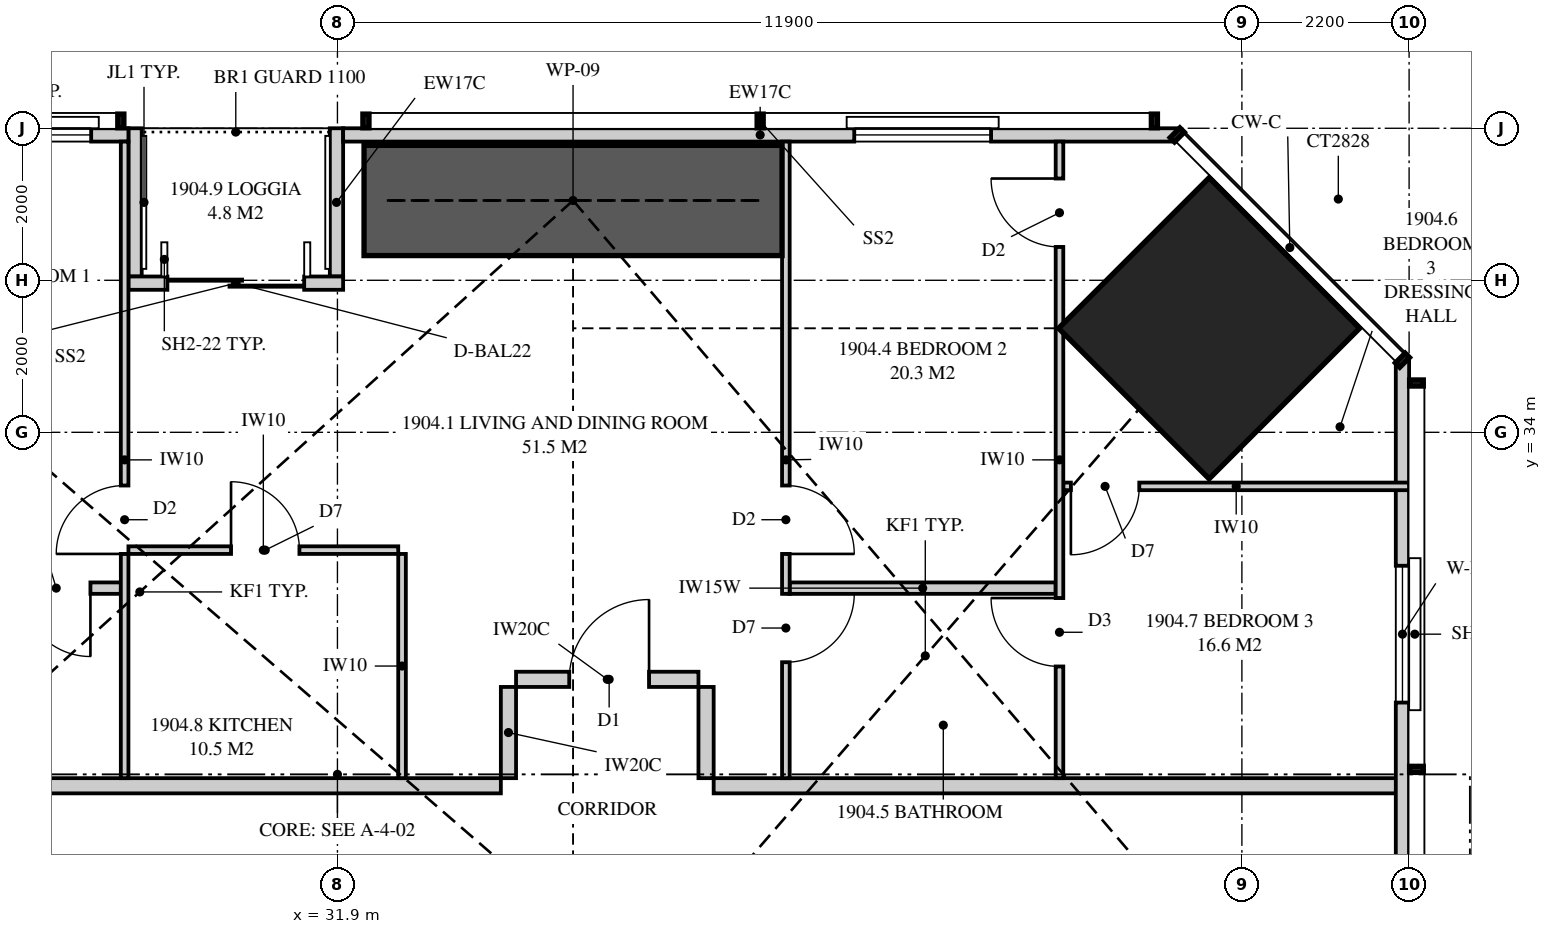
"""IFC4 building model, lengths in metres.
Left out: names, types, materials, properties, quantities, classifications, styles, units other than length and angle.
Written with IfcOpenShell. Run it as: python <this file> out.ifc"""

import sys

from ifc_helpers import new_model, si_unit, direction, frame, frame_2d, origin, origin_2d, place, context, subcontext, project, spatial, polyline, rectangle, hollow_rectangle, outline, extrude, element, fill, save


model = new_model("IFC4")
c1 = context("Model", 3, precision=1e-05, world=origin(), true_north=direction((0.0, 1.0)))
c2 = subcontext(c1, "Body", "Model", "MODEL_VIEW")
j1 = project(units=[si_unit("LENGTHUNIT", "METRE"), si_unit("PLANEANGLEUNIT", "RADIAN")], contexts=[c1])
p1 = place(None, origin())
s1 = spatial("IfcSite", under=j1, at=p1, CompositionType="ELEMENT")
p2 = place(p1, origin())
s2 = spatial("IfcBuilding", under=s1, at=p2, CompositionType="ELEMENT")
p3 = place(p2, frame((0.0, 0.0, 71.25)))
s3 = spatial("IfcBuildingStorey", under=s2, at=p3, CompositionType="ELEMENT", Elevation=71.25)
p4 = place(p3, frame((43.369, 35.369, 0.0), z_axis=(0.0, 0.0, 1.0), x_axis=(-0.707106781187, -0.707106781187, 0.0)))
e1 = element("IfcColumn", 1, at=p4, inside=s3, PredefinedType="COLUMN", context=c2, shape_type="SweptSolid", body=[
    extrude(hollow_rectangle(XDim=2.8, YDim=2.8, WallThickness=0.25, at=origin_2d()), origin(), (0.0, 0.0, 1.0), 3.5),
])
p5 = place(p3, frame((45.913, 3.051, 0.0), z_axis=(0.0, 0.0, 1.0), x_axis=(0.0, 1.0, 0.0)))
e2 = element("IfcWall", 2, at=p5, inside=s3, PredefinedType="SOLIDWALL", context=c2, shape_type="SweptSolid", body=[
    extrude(outline(polyline([(0.0, 0.0), (31.897, 0.0), (31.897, 3.22), (21.495, 3.22), (21.495, 2.256), (18.993, 3.22), (0.0, 3.22), (0.0, 0.0)])), frame((0.0, 0.087, 0.0), z_axis=(0.0, -1.0, 0.0), x_axis=(1.0, 0.0, 0.0)), (0.0, 0.0, 1.0), 0.175),
])
p6 = place(p5, frame((2.204, 0.0, 0.4)))
e3 = element("IfcOpeningElement", 3, at=p6, cuts=e2, PredefinedType="OPENING", context=c2, shape_type="SweptSolid", body=[
    extrude(rectangle(XDim=1.8, YDim=1.85, at=frame_2d((0.9, 0.925))), frame((0.0, 0.097, 0.0), z_axis=(0.0, -1.0, 0.0), x_axis=(1.0, 0.0, 0.0)), (0.0, 0.0, 1.0), 0.195),
])
p7 = place(p5, frame((14.849, 0.0, 0.4)))
e4 = element("IfcOpeningElement", 4, at=p7, cuts=e2, PredefinedType="OPENING", context=c2, shape_type="SweptSolid", body=[
    extrude(rectangle(XDim=1.2, YDim=1.85, at=frame_2d((0.6, 0.925))), frame((0.0, 0.097, 0.0), z_axis=(0.0, -1.0, 0.0), x_axis=(1.0, 0.0, 0.0)), (0.0, 0.0, 1.0), 0.195),
])
p8 = place(p5, frame((27.393, 0.0, 0.4)))
e5 = element("IfcOpeningElement", 5, at=p8, cuts=e2, PredefinedType="OPENING", context=c2, shape_type="SweptSolid", body=[
    extrude(rectangle(XDim=1.8, YDim=1.85, at=frame_2d((0.9, 0.925))), frame((0.0, 0.097, 0.0), z_axis=(0.0, -1.0, 0.0), x_axis=(1.0, 0.0, 0.0)), (0.0, 0.0, 1.0), 0.195),
])
p9 = place(p3, frame((42.949, 37.913, 0.0), z_axis=(0.0, 0.0, 1.0), x_axis=(-1.0, 0.0, 0.0)))
e6 = element("IfcWall", 6, at=p9, inside=s3, PredefinedType="SOLIDWALL", context=c2, shape_type="SweptSolid", body=[
    extrude(rectangle(XDim=10.974, YDim=0.175, at=frame_2d((5.487, 0.0))), origin(), (0.0, 0.0, 1.0), 3.22),
])
p10 = place(p9, frame((2.449, 0.0, 0.4)))
e7 = element("IfcOpeningElement", 7, at=p10, cuts=e6, PredefinedType="OPENING", context=c2, shape_type="SweptSolid", body=[
    extrude(rectangle(XDim=1.8, YDim=1.85, at=frame_2d((0.9, 0.925))), frame((0.0, 0.097, 0.0), z_axis=(0.0, -1.0, 0.0), x_axis=(1.0, 0.0, 0.0)), (0.0, 0.0, 1.0), 0.195),
])
p11 = place(p3, frame((29.15, 37.913, 0.0), z_axis=(0.0, 0.0, 1.0), x_axis=(-1.0, 0.0, 0.0)))
e8 = element("IfcWall", 8, at=p11, inside=s3, PredefinedType="SOLIDWALL", context=c2, shape_type="SweptSolid", body=[
    extrude(rectangle(XDim=7.95, YDim=0.175, at=frame_2d((3.975, 0.0))), origin(), (0.0, 0.0, 1.0), 3.22),
])
p12 = place(p11, frame((0.49, 0.0, 0.4)))
e9 = element("IfcOpeningElement", 9, at=p12, cuts=e8, PredefinedType="OPENING", context=c2, shape_type="SweptSolid", body=[
    extrude(rectangle(XDim=1.8, YDim=1.85, at=frame_2d((0.9, 0.925))), frame((0.0, 0.097, 0.0), z_axis=(0.0, -1.0, 0.0), x_axis=(1.0, 0.0, 0.0)), (0.0, 0.0, 1.0), 0.195),
])
p13 = place(p3, frame((31.975, 35.962, 0.0), z_axis=(0.0, 0.0, 1.0), x_axis=(-1.0, 0.0, 0.0)))
e10 = element("IfcWall", 10, at=p13, inside=s3, PredefinedType="SOLIDWALL", context=c2, shape_type="SweptSolid", body=[
    extrude(rectangle(XDim=2.825, YDim=0.175, at=frame_2d((1.413, 0.0))), origin(), (0.0, 0.0, 1.0), 3.22),
])
p14 = place(p13, frame((0.512, 0.0, 0.0)))
e11 = element("IfcOpeningElement", 11, at=p14, cuts=e10, PredefinedType="OPENING", context=c2, shape_type="SweptSolid", body=[
    extrude(rectangle(XDim=1.8, YDim=2.25, at=frame_2d((0.9, 1.125))), frame((0.0, 0.097, 0.0), z_axis=(0.0, -1.0, 0.0), x_axis=(1.0, 0.0, 0.0)), (0.0, 0.0, 1.0), 0.195),
])
for number, where, z_axis, x_axis in (
    (12, (31.887, 38.0, 0.0), (0.0, 0.0, 1.0), (0.0, -1.0, 0.0)),
    (13, (29.238, 38.0, 0.0), (0.0, 0.0, 1.0), (0.0, -1.0, 0.0)),
):
    element("IfcWall", number, at=place(p3, frame(where, z_axis=z_axis, x_axis=x_axis)), inside=s3, PredefinedType="SOLIDWALL", context=c2, shape_type="SweptSolid", body=[
        extrude(outline(polyline([(0.0, 0.0), (1.95, 0.0), (1.95, 3.22), (1.65, 3.22), (1.65, 2.1), (0.25, 2.1), (0.25, 3.22), (0.0, 3.22), (0.0, 0.0)])), frame((0.0, 0.087, 0.0), z_axis=(0.0, -1.0, 0.0), x_axis=(1.0, 0.0, 0.0)), (0.0, 0.0, 1.0), 0.175),
    ])
p15 = place(p3, frame((25.0, 29.35, 0.0), z_axis=(0.0, 0.0, 1.0), x_axis=(1.0, 0.0, 0.0)))
e14 = element("IfcWall", 14, at=p15, inside=s3, PredefinedType="PARTITIONING", context=c2, shape_type="SweptSolid", body=[
    extrude(outline(polyline([(0.0, 0.0), (9.05, 0.0), (9.05, 3.22), (8.373, 3.22), (8.373, 2.641), (7.42, 2.641), (7.42, 3.22), (1.941, 3.22), (1.941, 2.641), (1.015, 2.641), (1.015, 3.22), (0.0, 3.22), (0.0, 0.0)])), frame((0.0, 0.1, 0.0), z_axis=(0.0, -1.0, 0.0), x_axis=(1.0, 0.0, 0.0)), (0.0, 0.0, 1.0), 0.2),
])
p16 = place(p3, frame((29.1, 37.825, 0.0), z_axis=(0.0, 0.0, 1.0), x_axis=(0.0, -1.0, 0.0)))
e15 = element("IfcWall", 15, at=p16, inside=s3, PredefinedType="PARTITIONING", context=c2, shape_type="SweptSolid", body=[
    extrude(outline(polyline([(0.0, 0.0), (8.375, 0.0), (8.375, 3.22), (6.469, 3.22), (6.469, 2.641), (5.742, 2.641), (5.742, 3.22), (5.545, 3.22), (5.545, 2.641), (4.833, 2.641), (4.833, 3.22), (1.475, 3.22), (1.475, 2.1), (0.075, 2.1), (0.075, 3.22), (0.0, 3.22), (0.0, 0.0)])), frame((0.0, 0.05, 0.0), z_axis=(0.0, -1.0, 0.0), x_axis=(1.0, 0.0, 0.0)), (0.0, 0.0, 1.0), 0.1),
])
p17 = place(p16, frame((4.525, 0.0, 0.0)))
e16 = element("IfcOpeningElement", 16, at=p17, cuts=e15, PredefinedType="OPENING", context=c2, shape_type="SweptSolid", body=[
    extrude(rectangle(XDim=0.9, YDim=2.1, at=frame_2d((0.45, 1.05))), frame((0.0, 0.06, 0.0), z_axis=(0.0, -1.0, 0.0), x_axis=(1.0, 0.0, 0.0)), (0.0, 0.0, 1.0), 0.12),
])
p18 = place(p3, frame((37.8, 37.825, 0.0), z_axis=(0.0, 0.0, 1.0), x_axis=(0.0, -1.0, 0.0)))
e17 = element("IfcWall", 17, at=p18, inside=s3, PredefinedType="PARTITIONING", context=c2, shape_type="SweptSolid", body=[
    extrude(outline(polyline([(0.0, 0.0), (8.375, 0.0), (8.375, 3.22), (4.474, 3.22), (4.474, 2.641), (3.716, 2.641), (3.716, 2.62), (2.062, 2.62), (2.062, 2.1), (0.614, 2.1), (0.614, 3.22), (0.0, 3.22), (0.0, 0.0)])), frame((0.0, 0.05, 0.0), z_axis=(0.0, -1.0, 0.0), x_axis=(1.0, 0.0, 0.0)), (0.0, 0.0, 1.0), 0.1),
])
p19 = place(p18, frame((4.525, 0.0, 0.0)))
e18 = element("IfcOpeningElement", 18, at=p19, cuts=e17, PredefinedType="OPENING", context=c2, shape_type="SweptSolid", body=[
    extrude(rectangle(XDim=0.9, YDim=2.1, at=frame_2d((0.45, 1.05))), frame((0.0, 0.06, 0.0), z_axis=(0.0, -1.0, 0.0), x_axis=(1.0, 0.0, 0.0)), (0.0, 0.0, 1.0), 0.12),
])
p20 = place(p18, frame((5.95, 0.0, 0.0)))
e19 = element("IfcOpeningElement", 19, at=p20, cuts=e17, PredefinedType="OPENING", context=c2, shape_type="SweptSolid", body=[
    extrude(rectangle(XDim=0.9, YDim=2.1, at=frame_2d((0.45, 1.05))), frame((0.0, 0.06, 0.0), z_axis=(0.0, -1.0, 0.0), x_axis=(1.0, 0.0, 0.0)), (0.0, 0.0, 1.0), 0.12),
])
p21 = place(p3, frame((41.4, 37.825, 0.0), z_axis=(0.0, 0.0, 1.0), x_axis=(0.0, -1.0, 0.0)))
e20 = element("IfcWall", 20, at=p21, inside=s3, PredefinedType="PARTITIONING", context=c2, shape_type="SweptSolid", body=[
    extrude(outline(polyline([(0.0, 0.0), (8.375, 0.0), (8.375, 2.641), (7.844, 2.641), (7.844, 3.22), (5.146, 3.22), (5.146, 2.641), (4.31, 2.641), (4.31, 3.22), (3.716, 3.22), (3.716, 2.62), (2.785, 2.62), (2.785, 2.1), (1.337, 2.1), (1.337, 2.62), (1.196, 2.62), (1.196, 3.22), (0.0, 3.22), (0.0, 0.0)])), frame((0.0, 0.05, 0.0), z_axis=(0.0, -1.0, 0.0), x_axis=(1.0, 0.0, 0.0)), (0.0, 0.0, 1.0), 0.1),
])
p22 = place(p21, frame((0.486, 0.0, 0.0)))
e21 = element("IfcOpeningElement", 21, at=p22, cuts=e20, PredefinedType="OPENING", context=c2, shape_type="SweptSolid", body=[
    extrude(rectangle(XDim=0.9, YDim=2.1, at=frame_2d((0.45, 1.05))), frame((0.0, 0.06, 0.0), z_axis=(0.0, -1.0, 0.0), x_axis=(1.0, 0.0, 0.0)), (0.0, 0.0, 1.0), 0.12),
])
p23 = place(p21, frame((6.006, 0.0, 0.0)))
e22 = element("IfcOpeningElement", 22, at=p23, cuts=e20, PredefinedType="OPENING", context=c2, shape_type="SweptSolid", body=[
    extrude(rectangle(XDim=0.9, YDim=2.1, at=frame_2d((0.45, 1.05))), frame((0.0, 0.06, 0.0), z_axis=(0.0, -1.0, 0.0), x_axis=(1.0, 0.0, 0.0)), (0.0, 0.0, 1.0), 0.12),
])
p24 = place(p3, frame((25.0, 31.95, 0.0), z_axis=(0.0, 0.0, 1.0), x_axis=(1.0, 0.0, 0.0)))
e23 = element("IfcWall", 23, at=p24, inside=s3, PredefinedType="PLUMBINGWALL", context=c2, shape_type="SweptSolid", body=[
    extrude(outline(polyline([(0.0, 0.0), (4.05, 0.0), (4.05, 2.641), (3.92, 2.641), (3.92, 3.22), (0.0, 3.22), (0.0, 0.0)])), frame((0.0, 0.075, 0.0), z_axis=(0.0, -1.0, 0.0), x_axis=(1.0, 0.0, 0.0)), (0.0, 0.0, 1.0), 0.15),
])
p25 = place(p24, frame((2.75, 0.0, 0.0)))
e24 = element("IfcOpeningElement", 24, at=p25, cuts=e23, PredefinedType="OPENING", context=c2, shape_type="SweptSolid", body=[
    extrude(rectangle(XDim=0.9, YDim=2.1, at=frame_2d((0.45, 1.05))), frame((0.0, 0.085, 0.0), z_axis=(0.0, -1.0, 0.0), x_axis=(1.0, 0.0, 0.0)), (0.0, 0.0, 1.0), 0.17),
])
p26 = place(p3, frame((37.85, 31.95, 0.0), z_axis=(0.0, 0.0, 1.0), x_axis=(1.0, 0.0, 0.0)))
e25 = element("IfcWall", 25, at=p26, inside=s3, PredefinedType="PLUMBINGWALL", context=c2, shape_type="SweptSolid", body=[
    extrude(outline(polyline([(0.0, 0.0), (3.5, 0.0), (3.5, 3.22), (2.934, 3.22), (2.934, 2.641), (2.179, 2.641), (2.179, 3.22), (1.882, 3.22), (1.882, 2.641), (1.133, 2.641), (1.133, 3.22), (0.0, 3.22), (0.0, 0.0)])), frame((0.0, 0.075, 0.0), z_axis=(0.0, -1.0, 0.0), x_axis=(1.0, 0.0, 0.0)), (0.0, 0.0, 1.0), 0.15),
])
p27 = place(p3, frame((41.45, 33.289, 0.0), z_axis=(0.0, 0.0, 1.0), x_axis=(1.0, 0.0, 0.0)))
e26 = element("IfcWall", 26, at=p27, inside=s3, PredefinedType="PARTITIONING", context=c2, shape_type="SweptSolid", body=[
    extrude(outline(polyline([(0.0, 0.0), (4.55, 0.0), (4.55, 3.22), (2.973, 3.22), (2.973, 2.1), (1.539, 2.1), (1.539, 3.22), (0.472, 3.22), (0.472, 2.641), (0.0, 2.641), (0.0, 0.0)])), frame((0.0, 0.05, 0.0), z_axis=(0.0, -1.0, 0.0), x_axis=(1.0, 0.0, 0.0)), (0.0, 0.0, 1.0), 0.1),
])
p28 = place(p27, frame((0.1, 0.0, 0.0)))
e27 = element("IfcOpeningElement", 27, at=p28, cuts=e26, PredefinedType="OPENING", context=c2, shape_type="SweptSolid", body=[
    extrude(rectangle(XDim=0.9, YDim=2.1, at=frame_2d((0.45, 1.05))), frame((0.0, 0.06, 0.0), z_axis=(0.0, -1.0, 0.0), x_axis=(1.0, 0.0, 0.0)), (0.0, 0.0, 1.0), 0.12),
])
p29 = place(p3, frame((29.15, 32.45, 0.0), z_axis=(0.0, 0.0, 1.0), x_axis=(1.0, 0.0, 0.0)))
e28 = element("IfcWall", 28, at=p29, inside=s3, PredefinedType="PARTITIONING", context=c2, shape_type="SweptSolid", body=[
    extrude(outline(polyline([(0.0, 0.0), (3.55, 0.0), (3.55, 3.22), (1.167, 3.22), (1.167, 2.641), (0.0, 2.641), (0.0, 0.0)])), frame((0.0, 0.05, 0.0), z_axis=(0.0, -1.0, 0.0), x_axis=(1.0, 0.0, 0.0)), (0.0, 0.0, 1.0), 0.1),
])
p30 = place(p29, frame((1.35, 0.0, 0.0)))
e29 = element("IfcOpeningElement", 29, at=p30, cuts=e28, PredefinedType="OPENING", context=c2, shape_type="SweptSolid", body=[
    extrude(rectangle(XDim=0.9, YDim=2.1, at=frame_2d((0.45, 1.05))), frame((0.0, 0.06, 0.0), z_axis=(0.0, -1.0, 0.0), x_axis=(1.0, 0.0, 0.0)), (0.0, 0.0, 1.0), 0.12),
])
p31 = place(p3, frame((32.75, 32.4, 0.0), z_axis=(0.0, 0.0, 1.0), x_axis=(0.0, -1.0, 0.0)))
e30 = element("IfcWall", 30, at=p31, inside=s3, PredefinedType="PARTITIONING", context=c2, shape_type="SweptSolid", body=[
    extrude(outline(polyline([(0.0, 0.0), (2.95, 0.0), (2.95, 2.641), (2.568, 2.641), (2.568, 3.22), (0.0, 3.22), (0.0, 0.0)])), frame((0.0, 0.05, 0.0), z_axis=(0.0, -1.0, 0.0), x_axis=(1.0, 0.0, 0.0)), (0.0, 0.0, 1.0), 0.1),
])
p32 = place(p3, frame((36.85, 29.35, 0.0), z_axis=(0.0, 0.0, 1.0), x_axis=(1.0, 0.0, 0.0)))
e31 = element("IfcWall", 31, at=p32, inside=s3, PredefinedType="PARTITIONING", context=c2, shape_type="SweptSolid", body=[
    extrude(outline(polyline([(0.0, 0.0), (9.15, 0.0), (9.15, 3.22), (8.22, 3.22), (8.22, 2.1), (6.769, 2.1), (6.769, 3.22), (5.125, 3.22), (5.125, 2.641), (4.333, 2.641), (4.333, 3.22), (1.702, 3.22), (1.702, 2.641), (0.904, 2.641), (0.904, 3.22), (0.0, 3.22), (0.0, 0.0)])), frame((0.0, 0.1, 0.0), z_axis=(0.0, -1.0, 0.0), x_axis=(1.0, 0.0, 0.0)), (0.0, 0.0, 1.0), 0.2),
])
p33 = place(p3, frame((34.25, 30.75, 0.0), z_axis=(0.0, 0.0, 1.0), x_axis=(1.0, 0.0, 0.0)))
e32 = element("IfcWall", 32, at=p33, inside=s3, PredefinedType="PARTITIONING", context=c2, shape_type="SweptSolid", body=[
    extrude(outline(polyline([(0.0, 0.0), (2.4, 0.0), (2.4, 3.22), (1.099, 3.22), (1.099, 2.621), (0.401, 2.621), (0.401, 3.22), (0.0, 3.22), (0.0, 0.0)])), frame((0.0, 0.1, 0.0), z_axis=(0.0, -1.0, 0.0), x_axis=(1.0, 0.0, 0.0)), (0.0, 0.0, 1.0), 0.2),
])
p34 = place(p33, frame((0.7, 0.0, 0.0)))
e33 = element("IfcOpeningElement", 33, at=p34, cuts=e32, PredefinedType="OPENING", context=c2, shape_type="SweptSolid", body=[
    extrude(rectangle(XDim=1.05, YDim=2.2, at=frame_2d((0.525, 1.1))), frame((0.0, 0.11, 0.0), z_axis=(0.0, -1.0, 0.0), x_axis=(1.0, 0.0, 0.0)), (0.0, 0.0, 1.0), 0.22),
])
for number, where, z_axis, x_axis in (
    (34, (34.15, 29.45, 0.0), (0.0, 0.0, 1.0), (0.0, 1.0, 0.0)),
    (35, (36.75, 29.45, 0.0), (0.0, 0.0, 1.0), (0.0, 1.0, 0.0)),
):
    element("IfcWall", number, at=place(p3, frame(where, z_axis=z_axis, x_axis=x_axis)), inside=s3, PredefinedType="PARTITIONING", context=c2, shape_type="SweptSolid", body=[
        extrude(rectangle(XDim=1.2, YDim=0.2, at=frame_2d((0.6, 0.0))), origin(), (0.0, 0.0, 1.0), 3.22),
    ])
p35 = place(p3, frame((32.25, 37.05, 0.0), z_axis=(0.0, 0.0, 1.0), x_axis=(1.0, 0.0, 0.0)))
e36 = element("IfcWall", 36, at=p35, inside=s3, PredefinedType="SHEAR", context=c2, shape_type="SweptSolid", body=[
    extrude(rectangle(XDim=5.5, YDim=1.45, at=frame_2d((2.75, 0.0))), origin(), (0.0, 0.0, 1.0), 3.5),
])
p36 = place(p8, origin())
e37 = element("IfcWindow", 37, at=p36, inside=s3, PartitioningType="SINGLE_PANEL", PredefinedType="WINDOW", context=c2, shape_type="SweptSolid", body=[
    extrude(rectangle(XDim=1.8, YDim=1.85, at=frame_2d((0.9, 0.925))), frame((0.0, 0.03, 0.0), z_axis=(0.0, -1.0, 0.0), x_axis=(1.0, 0.0, 0.0)), (0.0, 0.0, 1.0), 0.06),
])
fill(e5, e37)
p37 = place(p10, origin())
e38 = element("IfcWindow", 38, at=p37, inside=s3, PartitioningType="SINGLE_PANEL", PredefinedType="WINDOW", context=c2, shape_type="SweptSolid", body=[
    extrude(rectangle(XDim=1.8, YDim=1.85, at=frame_2d((0.9, 0.925))), frame((0.0, 0.03, 0.0), z_axis=(0.0, -1.0, 0.0), x_axis=(1.0, 0.0, 0.0)), (0.0, 0.0, 1.0), 0.06),
])
fill(e7, e38)
p38 = place(p14, origin())
e39 = element("IfcDoor", 39, at=p38, inside=s3, OperationType="SLIDING_TO_LEFT", PredefinedType="DOOR", context=c2, shape_type="SweptSolid", body=[
    extrude(rectangle(XDim=1.8, YDim=2.25, at=frame_2d((0.9, 1.125))), frame((0.0, 0.025, 0.0), z_axis=(0.0, -1.0, 0.0), x_axis=(1.0, 0.0, 0.0)), (0.0, 0.0, 1.0), 0.05),
])
fill(e11, e39)
p39 = place(p12, origin())
e40 = element("IfcWindow", 40, at=p39, inside=s3, PartitioningType="SINGLE_PANEL", PredefinedType="WINDOW", context=c2, shape_type="SweptSolid", body=[
    extrude(rectangle(XDim=1.8, YDim=1.85, at=frame_2d((0.9, 0.925))), frame((0.0, 0.03, 0.0), z_axis=(0.0, -1.0, 0.0), x_axis=(1.0, 0.0, 0.0)), (0.0, 0.0, 1.0), 0.06),
])
fill(e9, e40)
p40 = place(p34, origin())
e41 = element("IfcDoor", 41, at=p40, inside=s3, OperationType="SINGLE_SWING_RIGHT", PredefinedType="DOOR", context=c2, shape_type="SweptSolid", body=[
    extrude(rectangle(XDim=1.05, YDim=2.2, at=frame_2d((0.525, 1.1))), frame((0.0, 0.025, 0.0), z_axis=(0.0, -1.0, 0.0), x_axis=(1.0, 0.0, 0.0)), (0.0, 0.0, 1.0), 0.05),
])
fill(e33, e41)
p41 = place(p17, frame((0.9, 0.0, 0.0), z_axis=(0.0, 0.0, 1.0), x_axis=(-1.0, 0.0, 0.0)))
e42 = element("IfcDoor", 42, at=p41, inside=s3, OperationType="SINGLE_SWING_LEFT", PredefinedType="DOOR", context=c2, shape_type="SweptSolid", body=[
    extrude(rectangle(XDim=0.9, YDim=2.1, at=frame_2d((0.45, 1.05))), frame((0.0, 0.025, 0.0), z_axis=(0.0, -1.0, 0.0), x_axis=(1.0, 0.0, 0.0)), (0.0, 0.0, 1.0), 0.05),
])
fill(e16, e42)
p42 = place(p25, frame((0.9, 0.0, 0.0), z_axis=(0.0, 0.0, 1.0), x_axis=(-1.0, 0.0, 0.0)))
e43 = element("IfcDoor", 43, at=p42, inside=s3, OperationType="SINGLE_SWING_LEFT", PredefinedType="DOOR", context=c2, shape_type="SweptSolid", body=[
    extrude(rectangle(XDim=0.9, YDim=2.1, at=frame_2d((0.45, 1.05))), frame((0.0, 0.025, 0.0), z_axis=(0.0, -1.0, 0.0), x_axis=(1.0, 0.0, 0.0)), (0.0, 0.0, 1.0), 0.05),
])
fill(e24, e43)
p43 = place(p19, origin())
e44 = element("IfcDoor", 44, at=p43, inside=s3, OperationType="SINGLE_SWING_RIGHT", PredefinedType="DOOR", context=c2, shape_type="SweptSolid", body=[
    extrude(rectangle(XDim=0.9, YDim=2.1, at=frame_2d((0.45, 1.05))), frame((0.0, 0.025, 0.0), z_axis=(0.0, -1.0, 0.0), x_axis=(1.0, 0.0, 0.0)), (0.0, 0.0, 1.0), 0.05),
])
fill(e18, e44)
p44 = place(p20, origin())
e45 = element("IfcDoor", 45, at=p44, inside=s3, OperationType="SINGLE_SWING_LEFT", PredefinedType="DOOR", context=c2, shape_type="SweptSolid", body=[
    extrude(rectangle(XDim=0.9, YDim=2.1, at=frame_2d((0.45, 1.05))), frame((0.0, 0.025, 0.0), z_axis=(0.0, -1.0, 0.0), x_axis=(1.0, 0.0, 0.0)), (0.0, 0.0, 1.0), 0.05),
])
fill(e19, e45)
p45 = place(p28, frame((0.9, 0.0, 0.0), z_axis=(0.0, 0.0, 1.0), x_axis=(-1.0, 0.0, 0.0)))
e46 = element("IfcDoor", 46, at=p45, inside=s3, OperationType="SINGLE_SWING_RIGHT", PredefinedType="DOOR", context=c2, shape_type="SweptSolid", body=[
    extrude(rectangle(XDim=0.9, YDim=2.1, at=frame_2d((0.45, 1.05))), frame((0.0, 0.025, 0.0), z_axis=(0.0, -1.0, 0.0), x_axis=(1.0, 0.0, 0.0)), (0.0, 0.0, 1.0), 0.05),
])
fill(e27, e46)
p46 = place(p22, frame((0.9, 0.0, 0.0), z_axis=(0.0, 0.0, 1.0), x_axis=(-1.0, 0.0, 0.0)))
e47 = element("IfcDoor", 47, at=p46, inside=s3, OperationType="SINGLE_SWING_RIGHT", PredefinedType="DOOR", context=c2, shape_type="SweptSolid", body=[
    extrude(rectangle(XDim=0.9, YDim=2.1, at=frame_2d((0.45, 1.05))), frame((0.0, 0.025, 0.0), z_axis=(0.0, -1.0, 0.0), x_axis=(1.0, 0.0, 0.0)), (0.0, 0.0, 1.0), 0.05),
])
fill(e21, e47)
p47 = place(p23, frame((0.9, 0.0, 0.0), z_axis=(0.0, 0.0, 1.0), x_axis=(-1.0, 0.0, 0.0)))
e48 = element("IfcDoor", 48, at=p47, inside=s3, OperationType="SINGLE_SWING_RIGHT", PredefinedType="DOOR", context=c2, shape_type="SweptSolid", body=[
    extrude(rectangle(XDim=0.9, YDim=2.1, at=frame_2d((0.45, 1.05))), frame((0.0, 0.025, 0.0), z_axis=(0.0, -1.0, 0.0), x_axis=(1.0, 0.0, 0.0)), (0.0, 0.0, 1.0), 0.05),
])
fill(e22, e48)
p48 = place(p30, origin())
e49 = element("IfcDoor", 49, at=p48, inside=s3, OperationType="SINGLE_SWING_LEFT", PredefinedType="DOOR", context=c2, shape_type="SweptSolid", body=[
    extrude(rectangle(XDim=0.9, YDim=2.1, at=frame_2d((0.45, 1.05))), frame((0.0, 0.025, 0.0), z_axis=(0.0, -1.0, 0.0), x_axis=(1.0, 0.0, 0.0)), (0.0, 0.0, 1.0), 0.05),
])
fill(e29, e49)
save(model, sys.argv[1])
